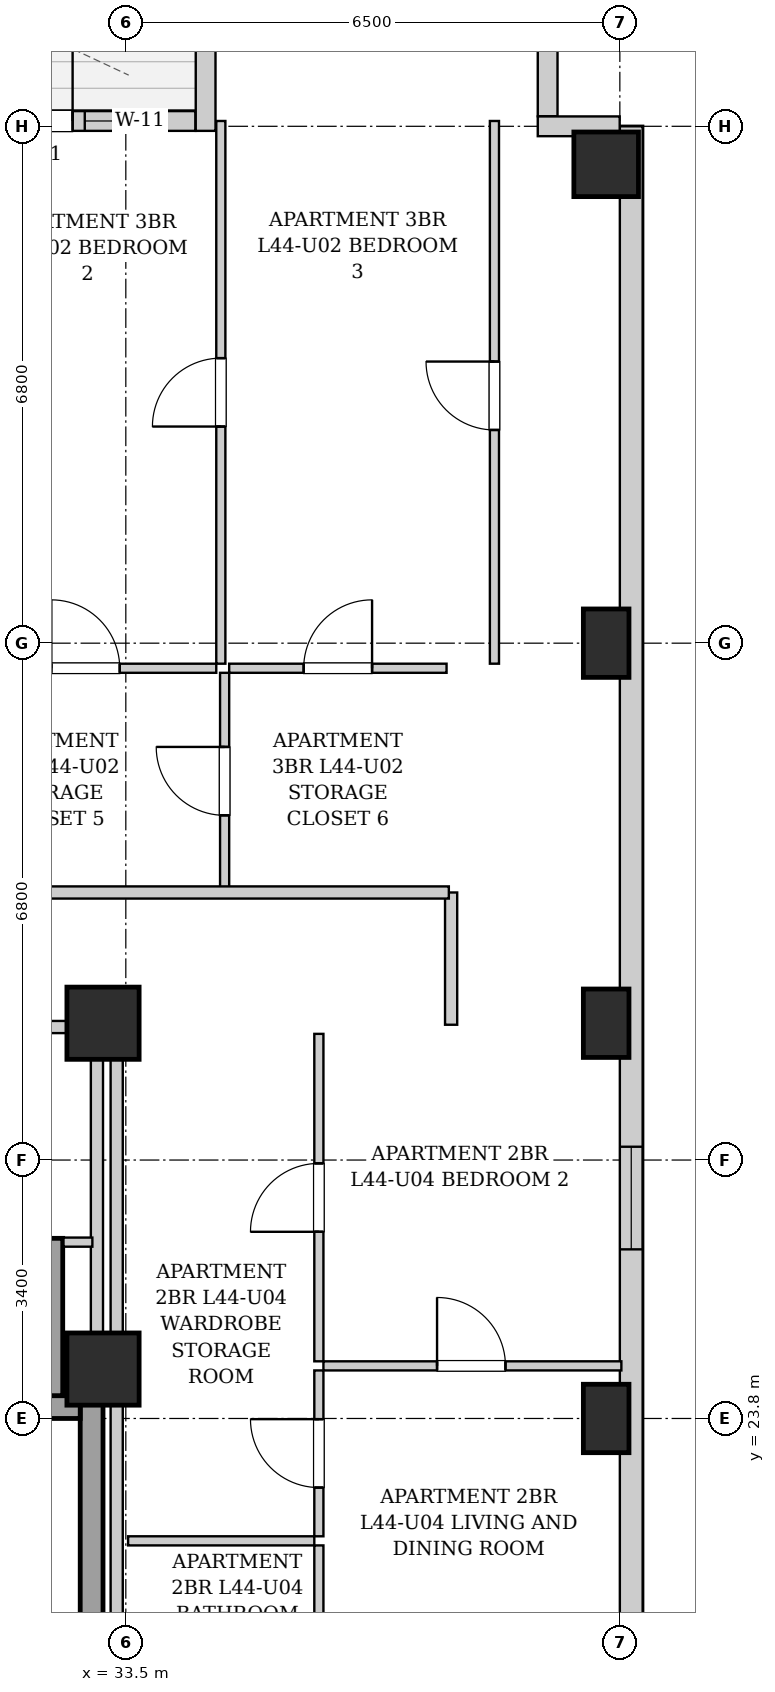
"""IFC4 building model, lengths in metres.
Left out: names, types, materials, properties, quantities, classifications, styles, units other than length and angle.
Written with IfcOpenShell. Run it as: python <this file> out.ifc"""

import sys

from ifc_helpers import new_model, si_unit, direction, frame, frame_2d, origin, origin_2d, place, context, subcontext, project, spatial, rectangle, extrude, element, fill, save


model = new_model("IFC4")
c1 = context("Model", 3, precision=1e-05, world=origin(), true_north=direction((0.0, 1.0)))
c2 = subcontext(c1, "Body", "Model", "MODEL_VIEW")
j1 = project(units=[si_unit("LENGTHUNIT", "METRE"), si_unit("PLANEANGLEUNIT", "RADIAN")], contexts=[c1])
p1 = place(None, origin())
s1 = spatial("IfcSite", under=j1, at=p1, CompositionType="ELEMENT")
p2 = place(p1, origin())
s2 = spatial("IfcBuilding", under=s1, at=p2, CompositionType="ELEMENT")
p3 = place(p2, frame((0.0, 0.0, 153.65)))
s3 = spatial("IfcBuildingStorey", under=s2, at=p3, CompositionType="ELEMENT", Elevation=153.65)
for number, where, z_axis, x_axis in (
    (1, (39.82, 23.8, 0.0), (0.0, 0.0, 1.0), (1.0, 0.0, 0.0)),
    (2, (39.82, 29.0, 0.0), (0.0, 0.0, 1.0), (1.0, 0.0, 0.0)),
    (3, (39.82, 34.0, 0.0), (0.0, 0.0, 1.0), (1.0, 0.0, 0.0)),
):
    element("IfcColumn", number, at=place(p3, frame(where, z_axis=z_axis, x_axis=x_axis)), inside=s3, PredefinedType="COLUMN", context=c2, shape_type="SweptSolid", body=[
        extrude(rectangle(XDim=0.6, YDim=0.9, at=origin_2d()), origin(), (0.0, 0.0, 1.0), 3.25),
    ])
p4 = place(p3, frame((39.82, 40.3, 0.0), z_axis=(0.0, 0.0, 1.0), x_axis=(1.0, 0.0, 0.0)))
e4 = element("IfcColumn", 4, at=p4, inside=s3, PredefinedType="COLUMN", context=c2, shape_type="SweptSolid", body=[
    extrude(rectangle(XDim=0.85, YDim=0.85, at=origin_2d()), origin(), (0.0, 0.0, 1.0), 3.25),
])
for number, where, z_axis, x_axis in (
    (5, (33.2, 29.0, 0.0), (0.0, 0.0, 1.0), (1.0, 0.0, 0.0)),
    (6, (33.2, 24.45, 0.0), (0.0, 0.0, 1.0), (1.0, 0.0, 0.0)),
):
    element("IfcColumn", number, at=place(p3, frame(where, z_axis=z_axis, x_axis=x_axis)), inside=s3, PredefinedType="COLUMN", context=c2, shape_type="SweptSolid", body=[
        extrude(rectangle(XDim=0.95, YDim=0.95, at=origin_2d()), origin(), (0.0, 0.0, 1.0), 3.25),
    ])
p5 = place(p3, frame((30.084, 40.87, 0.0), z_axis=(0.0, 0.0, 1.0), x_axis=(1.0, 0.0, 0.0)))
e7 = element("IfcWall", 7, at=p5, inside=s3, PredefinedType="SOLIDWALL", context=c2, shape_type="SweptSolid", body=[
    extrude(rectangle(XDim=4.332, YDim=0.26, at=frame_2d((2.166, 0.0))), origin(), (0.0, 0.0, 1.0), 2.99),
])
p6 = place(p5, frame((1.616, 0.0, 0.0)))
e8 = element("IfcOpeningElement", 8, at=p6, cuts=e7, PredefinedType="OPENING", context=c2, shape_type="SweptSolid", body=[
    extrude(rectangle(XDim=1.1, YDim=2.0, at=frame_2d((0.55, 1.0))), frame((0.0, 0.14, 0.0), z_axis=(0.0, -1.0, 0.0), x_axis=(1.0, 0.0, 0.0)), (0.0, 0.0, 1.0), 0.28),
])
p7 = place(p5, frame((2.876, 0.0, 0.55)))
e9 = element("IfcOpeningElement", 9, at=p7, cuts=e7, PredefinedType="OPENING", context=c2, shape_type="SweptSolid", body=[
    extrude(rectangle(XDim=0.85, YDim=1.2, at=frame_2d((0.425, 0.6))), frame((0.0, 0.14, 0.0), z_axis=(0.0, -1.0, 0.0), x_axis=(1.0, 0.0, 0.0)), (0.0, 0.0, 1.0), 0.28),
])
p8 = place(p3, frame((34.55, 40.74, 0.0), z_axis=(0.0, 0.0, 1.0), x_axis=(0.0, 1.0, 0.0)))
e10 = element("IfcWall", 10, at=p8, inside=s3, PredefinedType="SOLIDWALL", context=c2, shape_type="SweptSolid", body=[
    extrude(rectangle(XDim=2.4, YDim=0.26, at=frame_2d((1.2, 0.0))), origin(), (0.0, 0.0, 1.0), 2.99),
])
p9 = place(p3, frame((40.15, 40.8, 0.0), z_axis=(0.0, 0.0, 1.0), x_axis=(0.0, -1.0, 0.0)))
e11 = element("IfcWall", 11, at=p9, inside=s3, PredefinedType="SOLIDWALL", context=c2, shape_type="SweptSolid", body=[
    extrude(rectangle(XDim=34.5, YDim=0.3, at=frame_2d((17.25, 0.0))), origin(), (0.0, 0.0, 1.0), 2.99),
])
p10 = place(p9, frame((31.725, 0.0, 0.55)))
e12 = element("IfcOpeningElement", 12, at=p10, cuts=e11, PredefinedType="OPENING", context=c2, shape_type="SweptSolid", body=[
    extrude(rectangle(XDim=1.35, YDim=1.2, at=frame_2d((0.675, 0.6))), frame((0.0, 0.16, 0.0), z_axis=(0.0, -1.0, 0.0), x_axis=(1.0, 0.0, 0.0)), (0.0, 0.0, 1.0), 0.32),
])
p11 = place(p9, frame((22.8, 0.0, 0.55)))
e13 = element("IfcOpeningElement", 13, at=p11, cuts=e11, PredefinedType="OPENING", context=c2, shape_type="SweptSolid", body=[
    extrude(rectangle(XDim=1.35, YDim=1.2, at=frame_2d((0.675, 0.6))), frame((0.0, 0.16, 0.0), z_axis=(0.0, -1.0, 0.0), x_axis=(1.0, 0.0, 0.0)), (0.0, 0.0, 1.0), 0.32),
])
p12 = place(p9, frame((13.425, 0.0, 0.55)))
e14 = element("IfcOpeningElement", 14, at=p12, cuts=e11, PredefinedType="OPENING", context=c2, shape_type="SweptSolid", body=[
    extrude(rectangle(XDim=1.35, YDim=1.2, at=frame_2d((0.675, 0.6))), frame((0.0, 0.16, 0.0), z_axis=(0.0, -1.0, 0.0), x_axis=(1.0, 0.0, 0.0)), (0.0, 0.0, 1.0), 0.32),
])
p13 = place(p3, frame((39.05, 41.918, 0.0), z_axis=(0.0, 0.0, 1.0), x_axis=(0.0, -1.0, 0.0)))
e15 = element("IfcWall", 15, at=p13, inside=s3, PredefinedType="SOLIDWALL", context=c2, shape_type="SweptSolid", body=[
    extrude(rectangle(XDim=0.986, YDim=0.26, at=frame_2d((0.493, 0.0))), origin(), (0.0, 0.0, 1.0), 2.99),
])
p14 = place(p3, frame((38.92, 40.8, 0.0), z_axis=(0.0, 0.0, 1.0), x_axis=(1.0, 0.0, 0.0)))
e16 = element("IfcWall", 16, at=p14, inside=s3, PredefinedType="SOLIDWALL", context=c2, shape_type="SweptSolid", body=[
    extrude(rectangle(XDim=1.078, YDim=0.26, at=frame_2d((0.539, 0.0))), origin(), (0.0, 0.0, 1.0), 2.99),
])
p15 = place(p3, frame((33.05, 15.1, 0.0), z_axis=(0.0, 0.0, 1.0), x_axis=(0.0, 1.0, 0.0)))
e17 = element("IfcWall", 17, at=p15, inside=s3, PredefinedType="SHEAR", context=c2, shape_type="SweptSolid", body=[
    extrude(rectangle(XDim=9.0, YDim=0.3, at=frame_2d((4.5, 0.0))), origin(), (0.0, 0.0, 1.0), 2.99),
])
p16 = place(p3, frame((30.05, 23.95, 0.0), z_axis=(0.0, 0.0, 1.0), x_axis=(1.0, 0.0, 0.0)))
e18 = element("IfcWall", 18, at=p16, inside=s3, PredefinedType="SHEAR", context=c2, shape_type="SweptSolid", body=[
    extrude(rectangle(XDim=2.85, YDim=0.3, at=frame_2d((1.425, 0.0))), origin(), (0.0, 0.0, 1.0), 2.99),
])
p17 = place(p3, frame((32.56, 24.1, 0.0), z_axis=(0.0, 0.0, 1.0), x_axis=(0.0, 1.0, 0.0)))
e19 = element("IfcWall", 19, at=p17, inside=s3, PredefinedType="SHEAR", context=c2, shape_type="SweptSolid", body=[
    extrude(rectangle(XDim=2.07, YDim=0.22, at=frame_2d((1.035, 0.0))), origin(), (0.0, 0.0, 1.0), 2.99),
])
p18 = place(p3, frame((33.12, 24.12, 0.0), z_axis=(0.0, 0.0, 1.0), x_axis=(0.0, 1.0, 0.0)))
e20 = element("IfcWall", 20, at=p18, inside=s3, PredefinedType="PARTITIONING", context=c2, shape_type="SweptSolid", body=[
    extrude(rectangle(XDim=4.76, YDim=0.16, at=frame_2d((2.38, 0.0))), origin(), (0.0, 0.0, 1.0), 2.99),
])
p19 = place(p3, frame((32.68, 26.12, 0.0), z_axis=(0.0, 0.0, 1.0), x_axis=(1.0, 0.0, 0.0)))
e21 = element("IfcWall", 21, at=p19, inside=s3, PredefinedType="PARTITIONING", context=c2, shape_type="SweptSolid", body=[
    extrude(rectangle(XDim=0.38, YDim=0.12, at=frame_2d((0.19, 0.0))), origin(), (0.0, 0.0, 1.0), 2.99),
])
p20 = place(p3, frame((30.08, 28.95, 0.0), z_axis=(0.0, 0.0, 1.0), x_axis=(1.0, 0.0, 0.0)))
e22 = element("IfcWall", 22, at=p20, inside=s3, PredefinedType="PARTITIONING", context=c2, shape_type="SweptSolid", body=[
    extrude(rectangle(XDim=2.96, YDim=0.16, at=frame_2d((1.48, 0.0))), origin(), (0.0, 0.0, 1.0), 2.99),
])
p21 = place(p20, frame((0.695, 0.0, 0.0)))
e23 = element("IfcOpeningElement", 23, at=p21, cuts=e22, PredefinedType="OPENING", context=c2, shape_type="SweptSolid", body=[
    extrude(rectangle(XDim=0.86, YDim=2.05, at=frame_2d((0.43, 1.025))), frame((0.0, 0.09, 0.0), z_axis=(0.0, -1.0, 0.0), x_axis=(1.0, 0.0, 0.0)), (0.0, 0.0, 1.0), 0.18),
])
p22 = place(p3, frame((37.78, 28.98, 0.0), z_axis=(0.0, 0.0, 1.0), x_axis=(0.0, 1.0, 0.0)))
e24 = element("IfcWall", 24, at=p22, inside=s3, PredefinedType="PARTITIONING", context=c2, shape_type="SweptSolid", body=[
    extrude(rectangle(XDim=1.74, YDim=0.16, at=frame_2d((0.87, 0.0))), origin(), (0.0, 0.0, 1.0), 2.99),
])
p23 = place(p3, frame((34.8, 30.76, 0.0), z_axis=(0.0, 0.0, 1.0), x_axis=(0.0, 1.0, 0.0)))
e25 = element("IfcWall", 25, at=p23, inside=s3, PredefinedType="PARTITIONING", context=c2, shape_type="SweptSolid", body=[
    extrude(rectangle(XDim=2.85, YDim=0.12, at=frame_2d((1.425, 0.0))), origin(), (0.0, 0.0, 1.0), 2.99),
])
p24 = place(p23, frame((0.975, 0.0, 0.0)))
e26 = element("IfcOpeningElement", 26, at=p24, cuts=e25, PredefinedType="OPENING", context=c2, shape_type="SweptSolid", body=[
    extrude(rectangle(XDim=0.9, YDim=2.05, at=frame_2d((0.45, 1.025))), frame((0.0, 0.07, 0.0), z_axis=(0.0, -1.0, 0.0), x_axis=(1.0, 0.0, 0.0)), (0.0, 0.0, 1.0), 0.14),
])
p25 = place(p3, frame((31.25, 33.67, 0.0), z_axis=(0.0, 0.0, 1.0), x_axis=(1.0, 0.0, 0.0)))
e27 = element("IfcWall", 27, at=p25, inside=s3, PredefinedType="PARTITIONING", context=c2, shape_type="SweptSolid", body=[
    extrude(rectangle(XDim=3.44, YDim=0.12, at=frame_2d((1.72, 0.0))), origin(), (0.0, 0.0, 1.0), 2.99),
])
p26 = place(p25, frame((1.27, 0.0, 0.0)))
e28 = element("IfcOpeningElement", 28, at=p26, cuts=e27, PredefinedType="OPENING", context=c2, shape_type="SweptSolid", body=[
    extrude(rectangle(XDim=0.9, YDim=2.05, at=frame_2d((0.45, 1.025))), frame((0.0, 0.07, 0.0), z_axis=(0.0, -1.0, 0.0), x_axis=(1.0, 0.0, 0.0)), (0.0, 0.0, 1.0), 0.14),
])
p27 = place(p3, frame((34.86, 33.67, 0.0), z_axis=(0.0, 0.0, 1.0), x_axis=(1.0, 0.0, 0.0)))
e29 = element("IfcWall", 29, at=p27, inside=s3, PredefinedType="PARTITIONING", context=c2, shape_type="SweptSolid", body=[
    extrude(rectangle(XDim=2.86, YDim=0.12, at=frame_2d((1.43, 0.0))), origin(), (0.0, 0.0, 1.0), 2.99),
])
p28 = place(p27, frame((0.98, 0.0, 0.0)))
e30 = element("IfcOpeningElement", 30, at=p28, cuts=e29, PredefinedType="OPENING", context=c2, shape_type="SweptSolid", body=[
    extrude(rectangle(XDim=0.9, YDim=2.05, at=frame_2d((0.45, 1.025))), frame((0.0, 0.07, 0.0), z_axis=(0.0, -1.0, 0.0), x_axis=(1.0, 0.0, 0.0)), (0.0, 0.0, 1.0), 0.14),
])
p29 = place(p3, frame((34.75, 33.73, 0.0), z_axis=(0.0, 0.0, 1.0), x_axis=(0.0, 1.0, 0.0)))
e31 = element("IfcWall", 31, at=p29, inside=s3, PredefinedType="PARTITIONING", context=c2, shape_type="SweptSolid", body=[
    extrude(rectangle(XDim=7.14, YDim=0.12, at=frame_2d((3.57, 0.0))), origin(), (0.0, 0.0, 1.0), 2.99),
])
p30 = place(p29, frame((3.12, 0.0, 0.0)))
e32 = element("IfcOpeningElement", 32, at=p30, cuts=e31, PredefinedType="OPENING", context=c2, shape_type="SweptSolid", body=[
    extrude(rectangle(XDim=0.9, YDim=2.05, at=frame_2d((0.45, 1.025))), frame((0.0, 0.07, 0.0), z_axis=(0.0, -1.0, 0.0), x_axis=(1.0, 0.0, 0.0)), (0.0, 0.0, 1.0), 0.14),
])
p31 = place(p3, frame((38.35, 33.73, 0.0), z_axis=(0.0, 0.0, 1.0), x_axis=(0.0, 1.0, 0.0)))
e33 = element("IfcWall", 33, at=p31, inside=s3, PredefinedType="PARTITIONING", context=c2, shape_type="SweptSolid", body=[
    extrude(rectangle(XDim=7.14, YDim=0.12, at=frame_2d((3.57, 0.0))), origin(), (0.0, 0.0, 1.0), 2.99),
])
p32 = place(p31, frame((3.075, 0.0, 0.0)))
e34 = element("IfcOpeningElement", 34, at=p32, cuts=e33, PredefinedType="OPENING", context=c2, shape_type="SweptSolid", body=[
    extrude(rectangle(XDim=0.9, YDim=2.05, at=frame_2d((0.45, 1.025))), frame((0.0, 0.07, 0.0), z_axis=(0.0, -1.0, 0.0), x_axis=(1.0, 0.0, 0.0)), (0.0, 0.0, 1.0), 0.14),
])
p33 = place(p3, frame((33.53, 22.19, 0.0), z_axis=(0.0, 0.0, 1.0), x_axis=(1.0, 0.0, 0.0)))
e35 = element("IfcWall", 35, at=p33, inside=s3, PredefinedType="PARTITIONING", context=c2, shape_type="SweptSolid", body=[
    extrude(rectangle(XDim=2.45, YDim=0.12, at=frame_2d((1.225, 0.0))), origin(), (0.0, 0.0, 1.0), 2.99),
])
p34 = place(p3, frame((36.04, 22.25, 0.0), z_axis=(0.0, 0.0, 1.0), x_axis=(0.0, 1.0, 0.0)))
e36 = element("IfcWall", 36, at=p34, inside=s3, PredefinedType="PARTITIONING", context=c2, shape_type="SweptSolid", body=[
    extrude(rectangle(XDim=2.182, YDim=0.12, at=frame_2d((1.091, 0.0))), origin(), (0.0, 0.0, 1.0), 2.99),
])
p35 = place(p34, frame((0.641, 0.0, 0.0)))
e37 = element("IfcOpeningElement", 37, at=p35, cuts=e36, PredefinedType="OPENING", context=c2, shape_type="SweptSolid", body=[
    extrude(rectangle(XDim=0.9, YDim=2.05, at=frame_2d((0.45, 1.025))), frame((0.0, 0.07, 0.0), z_axis=(0.0, -1.0, 0.0), x_axis=(1.0, 0.0, 0.0)), (0.0, 0.0, 1.0), 0.14),
])
p36 = place(p3, frame((36.04, 24.552, 0.0), z_axis=(0.0, 0.0, 1.0), x_axis=(0.0, 1.0, 0.0)))
e38 = element("IfcWall", 38, at=p36, inside=s3, PredefinedType="PARTITIONING", context=c2, shape_type="SweptSolid", body=[
    extrude(rectangle(XDim=4.308, YDim=0.12, at=frame_2d((2.154, 0.0))), origin(), (0.0, 0.0, 1.0), 2.99),
])
p37 = place(p36, frame((1.704, 0.0, 0.0)))
e39 = element("IfcOpeningElement", 39, at=p37, cuts=e38, PredefinedType="OPENING", context=c2, shape_type="SweptSolid", body=[
    extrude(rectangle(XDim=0.9, YDim=2.05, at=frame_2d((0.45, 1.025))), frame((0.0, 0.07, 0.0), z_axis=(0.0, -1.0, 0.0), x_axis=(1.0, 0.0, 0.0)), (0.0, 0.0, 1.0), 0.14),
])
p38 = place(p3, frame((36.04, 19.83, 0.0), z_axis=(0.0, 0.0, 1.0), x_axis=(0.0, 1.0, 0.0)))
e40 = element("IfcWall", 40, at=p38, inside=s3, PredefinedType="PARTITIONING", context=c2, shape_type="SweptSolid", body=[
    extrude(rectangle(XDim=2.3, YDim=0.12, at=frame_2d((1.15, 0.0))), origin(), (0.0, 0.0, 1.0), 2.99),
])
p39 = place(p3, frame((36.1, 24.492, 0.0), z_axis=(0.0, 0.0, 1.0), x_axis=(1.0, 0.0, 0.0)))
e41 = element("IfcWall", 41, at=p39, inside=s3, PredefinedType="PARTITIONING", context=c2, shape_type="SweptSolid", body=[
    extrude(rectangle(XDim=3.92, YDim=0.12, at=frame_2d((1.96, 0.0))), origin(), (0.0, 0.0, 1.0), 2.621),
])
p40 = place(p39, frame((1.495, 0.0, 0.0)))
e42 = element("IfcOpeningElement", 42, at=p40, cuts=e41, PredefinedType="OPENING", context=c2, shape_type="SweptSolid", body=[
    extrude(rectangle(XDim=0.9, YDim=2.05, at=frame_2d((0.45, 1.025))), frame((0.0, 0.07, 0.0), z_axis=(0.0, -1.0, 0.0), x_axis=(1.0, 0.0, 0.0)), (0.0, 0.0, 1.0), 0.14),
])
p41 = place(p3, frame((10.05, 30.72, 0.0), z_axis=(0.0, 0.0, 1.0), x_axis=(1.0, 0.0, 0.0)))
e43 = element("IfcWall", 43, at=p41, inside=s3, PredefinedType="PARTITIONING", context=c2, shape_type="SweptSolid", body=[
    extrude(rectangle(XDim=27.7, YDim=0.16, at=frame_2d((13.85, 0.0))), origin(), (0.0, 0.0, 1.0), 2.99),
])
p42 = place(p41, frame((4.295, 0.0, 0.0)))
e44 = element("IfcOpeningElement", 44, at=p42, cuts=e43, PredefinedType="OPENING", context=c2, shape_type="SweptSolid", body=[
    extrude(rectangle(XDim=0.95, YDim=2.1, at=frame_2d((0.475, 1.05))), frame((0.0, 0.09, 0.0), z_axis=(0.0, -1.0, 0.0), x_axis=(1.0, 0.0, 0.0)), (0.0, 0.0, 1.0), 0.18),
])
p43 = place(p3, frame((33.38, 15.02, 0.0), z_axis=(0.0, 0.0, 1.0), x_axis=(0.0, 1.0, 0.0)))
e45 = element("IfcWall", 45, at=p43, inside=s3, PredefinedType="PARTITIONING", context=c2, shape_type="SweptSolid", body=[
    extrude(rectangle(XDim=13.98, YDim=0.16, at=frame_2d((6.99, 0.0))), origin(), (0.0, 0.0, 1.0), 2.99),
])
p44 = place(p24, origin())
e46 = element("IfcDoor", 46, at=p44, inside=s3, OperationType="SINGLE_SWING_RIGHT", PredefinedType="DOOR", context=c2, shape_type="SweptSolid", body=[
    extrude(rectangle(XDim=0.9, YDim=2.05, at=frame_2d((0.45, 1.025))), frame((0.0, 0.025, 0.0), z_axis=(0.0, -1.0, 0.0), x_axis=(1.0, 0.0, 0.0)), (0.0, 0.0, 1.0), 0.05),
])
fill(e26, e46)
p45 = place(p26, origin())
e47 = element("IfcDoor", 47, at=p45, inside=s3, OperationType="SINGLE_SWING_LEFT", PredefinedType="DOOR", context=c2, shape_type="SweptSolid", body=[
    extrude(rectangle(XDim=0.9, YDim=2.05, at=frame_2d((0.45, 1.025))), frame((0.0, 0.025, 0.0), z_axis=(0.0, -1.0, 0.0), x_axis=(1.0, 0.0, 0.0)), (0.0, 0.0, 1.0), 0.05),
])
fill(e28, e47)
p46 = place(p28, origin())
e48 = element("IfcDoor", 48, at=p46, inside=s3, OperationType="SINGLE_SWING_RIGHT", PredefinedType="DOOR", context=c2, shape_type="SweptSolid", body=[
    extrude(rectangle(XDim=0.9, YDim=2.05, at=frame_2d((0.45, 1.025))), frame((0.0, 0.025, 0.0), z_axis=(0.0, -1.0, 0.0), x_axis=(1.0, 0.0, 0.0)), (0.0, 0.0, 1.0), 0.05),
])
fill(e30, e48)
p47 = place(p30, origin())
e49 = element("IfcDoor", 49, at=p47, inside=s3, OperationType="SINGLE_SWING_LEFT", PredefinedType="DOOR", context=c2, shape_type="SweptSolid", body=[
    extrude(rectangle(XDim=0.9, YDim=2.05, at=frame_2d((0.45, 1.025))), frame((0.0, 0.025, 0.0), z_axis=(0.0, -1.0, 0.0), x_axis=(1.0, 0.0, 0.0)), (0.0, 0.0, 1.0), 0.05),
])
fill(e32, e49)
p48 = place(p32, origin())
e50 = element("IfcDoor", 50, at=p48, inside=s3, OperationType="SINGLE_SWING_RIGHT", PredefinedType="DOOR", context=c2, shape_type="SweptSolid", body=[
    extrude(rectangle(XDim=0.9, YDim=2.05, at=frame_2d((0.45, 1.025))), frame((0.0, 0.025, 0.0), z_axis=(0.0, -1.0, 0.0), x_axis=(1.0, 0.0, 0.0)), (0.0, 0.0, 1.0), 0.05),
])
fill(e34, e50)
p49 = place(p35, origin())
e51 = element("IfcDoor", 51, at=p49, inside=s3, OperationType="SINGLE_SWING_RIGHT", PredefinedType="DOOR", context=c2, shape_type="SweptSolid", body=[
    extrude(rectangle(XDim=0.9, YDim=2.05, at=frame_2d((0.45, 1.025))), frame((0.0, 0.025, 0.0), z_axis=(0.0, -1.0, 0.0), x_axis=(1.0, 0.0, 0.0)), (0.0, 0.0, 1.0), 0.05),
])
fill(e37, e51)
p50 = place(p37, origin())
e52 = element("IfcDoor", 52, at=p50, inside=s3, OperationType="SINGLE_SWING_LEFT", PredefinedType="DOOR", context=c2, shape_type="SweptSolid", body=[
    extrude(rectangle(XDim=0.9, YDim=2.05, at=frame_2d((0.45, 1.025))), frame((0.0, 0.025, 0.0), z_axis=(0.0, -1.0, 0.0), x_axis=(1.0, 0.0, 0.0)), (0.0, 0.0, 1.0), 0.05),
])
fill(e39, e52)
p51 = place(p40, origin())
e53 = element("IfcDoor", 53, at=p51, inside=s3, OperationType="SINGLE_SWING_LEFT", PredefinedType="DOOR", context=c2, shape_type="SweptSolid", body=[
    extrude(rectangle(XDim=0.9, YDim=2.05, at=frame_2d((0.45, 1.025))), frame((0.0, 0.025, 0.0), z_axis=(0.0, -1.0, 0.0), x_axis=(1.0, 0.0, 0.0)), (0.0, 0.0, 1.0), 0.05),
])
fill(e42, e53)
p52 = place(p6, origin())
e54 = element("IfcDoor", 54, at=p52, inside=s3, OperationType="SINGLE_SWING_RIGHT", PredefinedType="DOOR", context=c2, shape_type="SweptSolid", body=[
    extrude(rectangle(XDim=1.1, YDim=2.0, at=frame_2d((0.55, 1.0))), frame((0.0, 0.025, 0.0), z_axis=(0.0, -1.0, 0.0), x_axis=(1.0, 0.0, 0.0)), (0.0, 0.0, 1.0), 0.05),
])
fill(e8, e54)
p53 = place(p7, origin())
e55 = element("IfcWindow", 55, at=p53, inside=s3, PartitioningType="SINGLE_PANEL", PredefinedType="WINDOW", context=c2, shape_type="SweptSolid", body=[
    extrude(rectangle(XDim=0.85, YDim=1.2, at=frame_2d((0.425, 0.6))), frame((0.0, 0.03, 0.0), z_axis=(0.0, -1.0, 0.0), x_axis=(1.0, 0.0, 0.0)), (0.0, 0.0, 1.0), 0.06),
])
fill(e9, e55)
p54 = place(p12, origin())
e56 = element("IfcWindow", 56, at=p54, inside=s3, PartitioningType="SINGLE_PANEL", PredefinedType="WINDOW", context=c2, shape_type="SweptSolid", body=[
    extrude(rectangle(XDim=1.35, YDim=1.2, at=frame_2d((0.675, 0.6))), frame((0.0, 0.03, 0.0), z_axis=(0.0, -1.0, 0.0), x_axis=(1.0, 0.0, 0.0)), (0.0, 0.0, 1.0), 0.06),
])
fill(e14, e56)
save(model, sys.argv[1])
